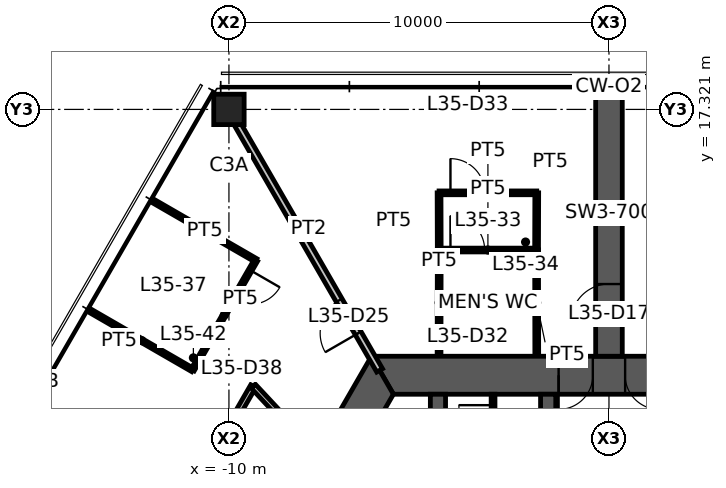
"""IFC4 building model, lengths in metres.
Left out: names, types, materials, properties, quantities, classifications, styles, units other than length and angle.
Written with IfcOpenShell. Run it as: python <this file> out.ifc"""

import sys

from ifc_helpers import new_model, si_unit, direction, frame, frame_2d, origin, origin_2d, place, context, subcontext, project, spatial, polyline, rectangle, hollow_rectangle, outline, extrude, element, fill, save


model = new_model("IFC4")
c1 = context("Model", 3, precision=1e-05, world=origin(), true_north=direction((0.0, 1.0)))
c2 = subcontext(c1, "Body", "Model", "MODEL_VIEW")
j1 = project(units=[si_unit("LENGTHUNIT", "METRE"), si_unit("PLANEANGLEUNIT", "RADIAN")], contexts=[c1])
p1 = place(None, origin())
s1 = spatial("IfcSite", under=j1, at=p1, CompositionType="ELEMENT")
p2 = place(p1, origin())
s2 = spatial("IfcBuilding", under=s1, at=p2, CompositionType="ELEMENT")
p3 = place(p2, frame((0.0, 0.0, 140.9)))
s3 = spatial("IfcBuildingStorey", under=s2, at=p3, CompositionType="ELEMENT", Elevation=140.9)
p4 = place(p3, frame((-10.0, 17.321, 0.0), z_axis=(0.0, 0.0, 1.0), x_axis=(1.0, 0.0, 0.0)))
e1 = element("IfcColumn", 1, at=p4, inside=s3, PredefinedType="COLUMN", context=c2, shape_type="SweptSolid", body=[
    extrude(hollow_rectangle(XDim=0.8, YDim=0.8, WallThickness=0.045, at=origin_2d()), origin(), (0.0, 0.0, 1.0), 3.9),
])
p5 = place(p3, frame((5.961, 10.325, 0.0), z_axis=(0.0, 0.0, 1.0), x_axis=(-1.0, 0.0, 0.0)))
e2 = element("IfcWall", 2, at=p5, inside=s3, PredefinedType="SHEAR", context=c2, shape_type="SweptSolid", body=[
    extrude(outline(polyline([(-0.289, -0.5), (4.636, -0.5), (5.536, -0.5), (6.386, -0.5), (7.286, -0.5), (12.211, -0.5), (11.634, 0.5), (7.286, 0.5), (6.386, 0.5), (5.536, 0.5), (4.636, 0.5), (0.289, 0.5), (-0.289, -0.5)])), origin(), (0.0, 0.0, 1.0), 3.9),
])
p6 = place(p5, frame((6.386, 0.0, 0.0)))
e3 = element("IfcOpeningElement", 3, at=p6, cuts=e2, PredefinedType="OPENING", context=c2, shape_type="SweptSolid", body=[
    extrude(rectangle(XDim=0.9, YDim=2.1, at=frame_2d((0.45, 1.05))), frame((0.0, 0.51, 0.0), z_axis=(0.0, -1.0, 0.0), x_axis=(1.0, 0.0, 0.0)), (0.0, 0.0, 1.0), 1.02),
])
p7 = place(p5, frame((4.636, 0.0, 0.0)))
e4 = element("IfcOpeningElement", 4, at=p7, cuts=e2, PredefinedType="OPENING", context=c2, shape_type="SweptSolid", body=[
    extrude(rectangle(XDim=0.9, YDim=2.1, at=frame_2d((0.45, 1.05))), frame((0.0, 0.51, 0.0), z_axis=(0.0, -1.0, 0.0), x_axis=(1.0, 0.0, 0.0)), (0.0, 0.0, 1.0), 1.02),
])
p8 = place(p3, frame((-5.961, 10.325, 0.0), z_axis=(0.0, 0.0, 1.0), x_axis=(-0.500004296715, -0.866022923061, 0.0)))
e5 = element("IfcWall", 5, at=p8, inside=s3, PredefinedType="SHEAR", context=c2, shape_type="SweptSolid", body=[
    extrude(outline(polyline([(-0.289, -0.5), (4.494, -0.5), (5.494, -0.5), (12.211, -0.5), (11.634, 0.5), (5.494, 0.5), (4.494, 0.5), (0.289, 0.5), (-0.289, -0.5)])), origin(), (0.0, 0.0, 1.0), 3.9),
])
p9 = place(p8, frame((4.494, 0.0, 0.0)))
e6 = element("IfcOpeningElement", 6, at=p9, cuts=e5, PredefinedType="OPENING", context=c2, shape_type="SweptSolid", body=[
    extrude(rectangle(XDim=1.0, YDim=2.1, at=frame_2d((0.5, 1.05))), frame((0.0, 0.51, 0.0), z_axis=(0.0, -1.0, 0.0), x_axis=(1.0, 0.0, 0.0)), (0.0, 0.0, 1.0), 1.02),
])
p10 = place(p3, frame((0.0, 10.825, 0.0), z_axis=(0.0, 0.0, 1.0), x_axis=(0.0, 1.0, 0.0)))
e7 = element("IfcWall", 7, at=p10, inside=s3, PredefinedType="SHEAR", context=c2, shape_type="SweptSolid", body=[
    extrude(rectangle(XDim=6.946, YDim=0.7, at=frame_2d((3.473, 0.0))), origin(), (0.0, 0.0, 1.0), 3.9),
])
p11 = place(p10, frame((0.9, 0.0, 0.0)))
e8 = element("IfcOpeningElement", 8, at=p11, cuts=e7, PredefinedType="OPENING", context=c2, shape_type="SweptSolid", body=[
    extrude(rectangle(XDim=1.0, YDim=2.1, at=frame_2d((0.5, 1.05))), frame((0.0, 0.36, 0.0), z_axis=(0.0, -1.0, 0.0), x_axis=(1.0, 0.0, 0.0)), (0.0, 0.0, 1.0), 0.72),
])
p12 = place(p3, frame((-1.6, 3.8, 0.0), z_axis=(0.0, 0.0, 1.0), x_axis=(0.0, 1.0, 0.0)))
e9 = element("IfcWall", 9, at=p12, inside=s3, PredefinedType="SHEAR", context=c2, shape_type="SweptSolid", body=[
    extrude(rectangle(XDim=6.025, YDim=0.4, at=frame_2d((3.012, 0.0))), origin(), (0.0, 0.0, 1.0), 3.9),
])
p13 = place(p12, frame((3.75, 0.0, 0.0)))
e10 = element("IfcOpeningElement", 10, at=p13, cuts=e9, PredefinedType="OPENING", context=c2, shape_type="SweptSolid", body=[
    extrude(rectangle(XDim=0.9, YDim=2.1, at=frame_2d((0.45, 1.05))), frame((0.0, 0.21, 0.0), z_axis=(0.0, -1.0, 0.0), x_axis=(1.0, 0.0, 0.0)), (0.0, 0.0, 1.0), 0.42),
])
p14 = place(p3, frame((-4.5, 3.8, 0.0), z_axis=(0.0, 0.0, 1.0), x_axis=(0.0, 1.0, 0.0)))
e11 = element("IfcWall", 11, at=p14, inside=s3, PredefinedType="SHEAR", context=c2, shape_type="SweptSolid", body=[
    extrude(rectangle(XDim=6.025, YDim=0.4, at=frame_2d((3.012, 0.0))), origin(), (0.0, 0.0, 1.0), 3.9),
])
p15 = place(p3, frame((-3.05, 6.6, 0.0), z_axis=(0.0, 0.0, 1.0), x_axis=(0.0, 1.0, 0.0)))
e12 = element("IfcWall", 12, at=p15, inside=s3, PredefinedType="PARTITIONING", context=c2, shape_type="SweptSolid", body=[
    extrude(rectangle(XDim=3.225, YDim=0.1, at=frame_2d((1.612, 0.0))), origin(), (0.0, 0.0, 1.0), 2.95),
])
p16 = place(p15, frame((0.5, 0.0, 0.0)))
e13 = element("IfcOpeningElement", 13, at=p16, cuts=e12, PredefinedType="OPENING", context=c2, shape_type="SweptSolid", body=[
    extrude(rectangle(XDim=0.9, YDim=2.1, at=frame_2d((0.45, 1.05))), frame((0.0, 0.06, 0.0), z_axis=(0.0, -1.0, 0.0), x_axis=(1.0, 0.0, 0.0)), (0.0, 0.0, 1.0), 0.12),
])
p17 = place(p15, frame((2.038, 0.0, 0.0)))
e14 = element("IfcOpeningElement", 14, at=p17, cuts=e12, PredefinedType="OPENING", context=c2, shape_type="SweptSolid", body=[
    extrude(rectangle(XDim=0.9, YDim=2.1, at=frame_2d((0.45, 1.05))), frame((0.0, 0.06, 0.0), z_axis=(0.0, -1.0, 0.0), x_axis=(1.0, 0.0, 0.0)), (0.0, 0.0, 1.0), 0.12),
])
p18 = place(p3, frame((-6.035, 10.453, 0.0), z_axis=(0.0, 0.0, 1.0), x_axis=(-0.499989830942, 0.866031274813, 0.0)))
e15 = element("IfcWall", 15, at=p18, inside=s3, PredefinedType="PARTITIONING", context=c2, shape_type="SweptSolid", body=[
    extrude(rectangle(XDim=7.93, YDim=0.175, at=frame_2d((3.965, 0.0))), origin(), (0.0, 0.0, 1.0), 3.05),
])
p19 = place(p18, frame((1.13, 0.0, 0.0)))
e16 = element("IfcOpeningElement", 16, at=p19, cuts=e15, PredefinedType="OPENING", context=c2, shape_type="SweptSolid", body=[
    extrude(rectangle(XDim=1.0, YDim=2.1, at=frame_2d((0.5, 1.05))), frame((0.0, 0.098, 0.0), z_axis=(0.0, -1.0, 0.0), x_axis=(1.0, 0.0, 0.0)), (0.0, 0.0, 1.0), 0.195),
])
p20 = place(p3, frame((-4.471, 13.62, 0.0), z_axis=(0.0, 0.0, 1.0), x_axis=(1.0, 0.0, 0.0)))
e17 = element("IfcWall", 17, at=p20, inside=s3, PredefinedType="PARTITIONING", context=c2, shape_type="SweptSolid", body=[
    extrude(rectangle(XDim=2.571, YDim=0.1, at=frame_2d((1.286, 0.0))), origin(), (0.0, 0.0, 1.0), 2.95),
])
p21 = place(p20, frame((0.3, 0.0, 0.0)))
e18 = element("IfcOpeningElement", 18, at=p21, cuts=e17, PredefinedType="OPENING", context=c2, shape_type="SweptSolid", body=[
    extrude(rectangle(XDim=0.9, YDim=2.1, at=frame_2d((0.45, 1.05))), frame((0.0, 0.06, 0.0), z_axis=(0.0, -1.0, 0.0), x_axis=(1.0, 0.0, 0.0)), (0.0, 0.0, 1.0), 0.12),
])
for number, where, z_axis, x_axis in (
    (19, (-4.471, 10.845, 0.0), (0.0, 0.0, 1.0), (0.002, 1.0, 0.0)),
    (20, (-1.905, 13.625, 0.0), (0.0, 0.0, 1.0), (0.002, -1.0, 0.0)),
):
    element("IfcWall", number, at=place(p3, frame(where, z_axis=z_axis, x_axis=x_axis)), inside=s3, PredefinedType="PARTITIONING", context=c2, shape_type="SweptSolid", body=[
        extrude(rectangle(XDim=2.78, YDim=0.1, at=frame_2d((1.39, 0.0))), origin(), (0.0, 0.0, 1.0), 2.95),
    ])
p22 = place(p3, frame((-4.471, 15.125, 0.0), z_axis=(0.0, 0.0, 1.0), x_axis=(1.0, 0.0, 0.0)))
e21 = element("IfcWall", 21, at=p22, inside=s3, PredefinedType="PARTITIONING", context=c2, shape_type="SweptSolid", body=[
    extrude(rectangle(XDim=2.571, YDim=0.1, at=frame_2d((1.286, 0.0))), origin(), (0.0, 0.0, 1.0), 2.95),
])
p23 = place(p22, frame((0.3, 0.0, 0.0)))
e22 = element("IfcOpeningElement", 22, at=p23, cuts=e21, PredefinedType="OPENING", context=c2, shape_type="SweptSolid", body=[
    extrude(rectangle(XDim=0.9, YDim=2.1, at=frame_2d((0.45, 1.05))), frame((0.0, 0.06, 0.0), z_axis=(0.0, -1.0, 0.0), x_axis=(1.0, 0.0, 0.0)), (0.0, 0.0, 1.0), 0.12),
])
for number, where, z_axis, x_axis in (
    (23, (-4.466, 13.625, 0.0), (0.0, 0.0, 1.0), (-0.003, 1.0, 0.0)),
    (24, (-1.9, 15.125, 0.0), (0.0, 0.0, 1.0), (-0.003, -1.0, 0.0)),
):
    element("IfcWall", number, at=place(p3, frame(where, z_axis=z_axis, x_axis=x_axis)), inside=s3, PredefinedType="PARTITIONING", context=c2, shape_type="SweptSolid", body=[
        extrude(rectangle(XDim=1.5, YDim=0.1, at=frame_2d((0.75, 0.0))), origin(), (0.0, 0.0, 1.0), 2.95),
    ])
p24 = place(p3, frame((-12.908, 3.893, 0.0), z_axis=(0.0, 0.0, 1.0), x_axis=(0.500006411147, 0.866021702275, 0.0)))
e25 = element("IfcWall", 25, at=p24, inside=s3, PredefinedType="PARTITIONING", context=c2, shape_type="SweptSolid", body=[
    extrude(rectangle(XDim=7.095, YDim=0.15, at=frame_2d((3.548, 0.0))), origin(), (0.0, 0.0, 1.0), 2.95),
])
p25 = place(p24, frame((3.047, 0.0, 0.0)))
e26 = element("IfcOpeningElement", 26, at=p25, cuts=e25, PredefinedType="OPENING", context=c2, shape_type="SweptSolid", body=[
    extrude(rectangle(XDim=1.0, YDim=2.1, at=frame_2d((0.5, 1.05))), frame((0.0, 0.085, 0.0), z_axis=(0.0, -1.0, 0.0), x_axis=(1.0, 0.0, 0.0)), (0.0, 0.0, 1.0), 0.17),
])
p26 = place(p3, frame((-9.36, 10.038, 0.0), z_axis=(0.0, 0.0, 1.0), x_axis=(0.681997114248, -0.731354863358, 0.0)))
e27 = element("IfcWall", 27, at=p26, inside=s3, PredefinedType="PARTITIONING", context=c2, shape_type="SweptSolid", body=[
    extrude(outline(polyline([(0.0, -0.075), (2.384, -0.075), (2.384, 0.0), (2.382, 0.075), (0.0, 0.075), (0.0, -0.075)])), origin(), (0.0, 0.0, 1.0), 2.95),
])
p27 = place(p3, frame((-11.98, 14.902, 0.0), z_axis=(0.0, 0.0, 1.0), x_axis=(0.866042875753, -0.499969736442, 0.0)))
e28 = element("IfcWall", 28, at=p27, inside=s3, PredefinedType="PARTITIONING", context=c2, shape_type="SweptSolid", body=[
    extrude(rectangle(XDim=3.105, YDim=0.1, at=frame_2d((1.553, 0.0))), origin(), (0.0, 0.0, 1.0), 2.95),
])
p28 = place(p3, frame((-10.956, 10.465, 0.0), z_axis=(0.0, 0.0, 1.0), x_axis=(-0.866044340336, 0.499967199496, 0.0)))
e29 = element("IfcWall", 29, at=p28, inside=s3, PredefinedType="PARTITIONING", context=c2, shape_type="SweptSolid", body=[
    extrude(rectangle(XDim=3.08, YDim=0.1, at=frame_2d((1.54, 0.0))), origin(), (0.0, 0.0, 1.0), 2.95),
])
p29 = place(p3, frame((-9.291, 13.349, 0.0), z_axis=(0.0, 0.0, 1.0), x_axis=(-0.500033344505, -0.86600615147, 0.0)))
e30 = element("IfcWall", 30, at=p29, inside=s3, PredefinedType="PARTITIONING", context=c2, shape_type="SweptSolid", body=[
    extrude(rectangle(XDim=3.331, YDim=0.1, at=frame_2d((1.666, 0.0))), origin(), (0.0, 0.0, 1.0), 2.95),
])
p30 = place(p29, frame((0.3, 0.0, 0.0)))
e31 = element("IfcOpeningElement", 31, at=p30, cuts=e30, PredefinedType="OPENING", context=c2, shape_type="SweptSolid", body=[
    extrude(rectangle(XDim=0.9, YDim=2.1, at=frame_2d((0.45, 1.05))), frame((0.0, 0.06, 0.0), z_axis=(0.0, -1.0, 0.0), x_axis=(1.0, 0.0, 0.0)), (0.0, 0.0, 1.0), 0.12),
])
p31 = place(p3, frame((0.0, 17.771, 0.0), z_axis=(0.0, 0.0, 1.0), x_axis=(0.0, 1.0, 0.0)))
e32 = element("IfcWall", 32, at=p31, inside=s3, PredefinedType="PARTITIONING", context=c2, shape_type="SweptSolid", body=[
    extrude(rectangle(XDim=0.08, YDim=0.175, at=frame_2d((0.04, 0.0))), origin(), (0.0, 0.0, 1.0), 3.9),
])
p32 = place(p6, origin())
e33 = element("IfcDoor", 33, at=p32, inside=s3, OperationType="SINGLE_SWING_RIGHT", PredefinedType="DOOR", context=c2, shape_type="SweptSolid", body=[
    extrude(rectangle(XDim=0.9, YDim=2.1, at=frame_2d((0.45, 1.05))), frame((0.0, 0.025, 0.0), z_axis=(0.0, -1.0, 0.0), x_axis=(1.0, 0.0, 0.0)), (0.0, 0.0, 1.0), 0.05),
])
fill(e3, e33)
p33 = place(p7, origin())
e34 = element("IfcDoor", 34, at=p33, inside=s3, OperationType="SINGLE_SWING_LEFT", PredefinedType="DOOR", context=c2, shape_type="SweptSolid", body=[
    extrude(rectangle(XDim=0.9, YDim=2.1, at=frame_2d((0.45, 1.05))), frame((0.0, 0.025, 0.0), z_axis=(0.0, -1.0, 0.0), x_axis=(1.0, 0.0, 0.0)), (0.0, 0.0, 1.0), 0.05),
])
fill(e4, e34)
p34 = place(p11, origin())
e35 = element("IfcDoor", 35, at=p34, inside=s3, OperationType="SINGLE_SWING_LEFT", PredefinedType="DOOR", context=c2, shape_type="SweptSolid", body=[
    extrude(rectangle(XDim=1.0, YDim=2.1, at=frame_2d((0.5, 1.05))), frame((0.0, 0.025, 0.0), z_axis=(0.0, -1.0, 0.0), x_axis=(1.0, 0.0, 0.0)), (0.0, 0.0, 1.0), 0.05),
])
fill(e8, e35)
p35 = place(p17, origin())
e36 = element("IfcDoor", 36, at=p35, inside=s3, OperationType="SINGLE_SWING_RIGHT", PredefinedType="DOOR", context=c2, shape_type="SweptSolid", body=[
    extrude(rectangle(XDim=0.9, YDim=2.1, at=frame_2d((0.45, 1.05))), frame((0.0, 0.025, 0.0), z_axis=(0.0, -1.0, 0.0), x_axis=(1.0, 0.0, 0.0)), (0.0, 0.0, 1.0), 0.05),
])
fill(e14, e36)
p36 = place(p19, origin())
e37 = element("IfcDoor", 37, at=p36, inside=s3, OperationType="SINGLE_SWING_LEFT", PredefinedType="DOOR", context=c2, shape_type="SweptSolid", body=[
    extrude(rectangle(XDim=1.0, YDim=2.1, at=frame_2d((0.5, 1.05))), frame((0.0, 0.025, 0.0), z_axis=(0.0, -1.0, 0.0), x_axis=(1.0, 0.0, 0.0)), (0.0, 0.0, 1.0), 0.05),
])
fill(e16, e37)
p37 = place(p21, origin())
e38 = element("IfcDoor", 38, at=p37, inside=s3, OperationType="SINGLE_SWING_LEFT", PredefinedType="DOOR", context=c2, shape_type="SweptSolid", body=[
    extrude(rectangle(XDim=0.9, YDim=2.1, at=frame_2d((0.45, 1.05))), frame((0.0, 0.025, 0.0), z_axis=(0.0, -1.0, 0.0), x_axis=(1.0, 0.0, 0.0)), (0.0, 0.0, 1.0), 0.05),
])
fill(e18, e38)
p38 = place(p23, origin())
e39 = element("IfcDoor", 39, at=p38, inside=s3, OperationType="SINGLE_SWING_LEFT", PredefinedType="DOOR", context=c2, shape_type="SweptSolid", body=[
    extrude(rectangle(XDim=0.9, YDim=2.1, at=frame_2d((0.45, 1.05))), frame((0.0, 0.025, 0.0), z_axis=(0.0, -1.0, 0.0), x_axis=(1.0, 0.0, 0.0)), (0.0, 0.0, 1.0), 0.05),
])
fill(e22, e39)
p39 = place(p30, origin())
e40 = element("IfcDoor", 40, at=p39, inside=s3, OperationType="SINGLE_SWING_LEFT", PredefinedType="DOOR", context=c2, shape_type="SweptSolid", body=[
    extrude(rectangle(XDim=0.9, YDim=2.1, at=frame_2d((0.45, 1.05))), frame((0.0, 0.025, 0.0), z_axis=(0.0, -1.0, 0.0), x_axis=(1.0, 0.0, 0.0)), (0.0, 0.0, 1.0), 0.05),
])
fill(e31, e40)
save(model, sys.argv[1])
